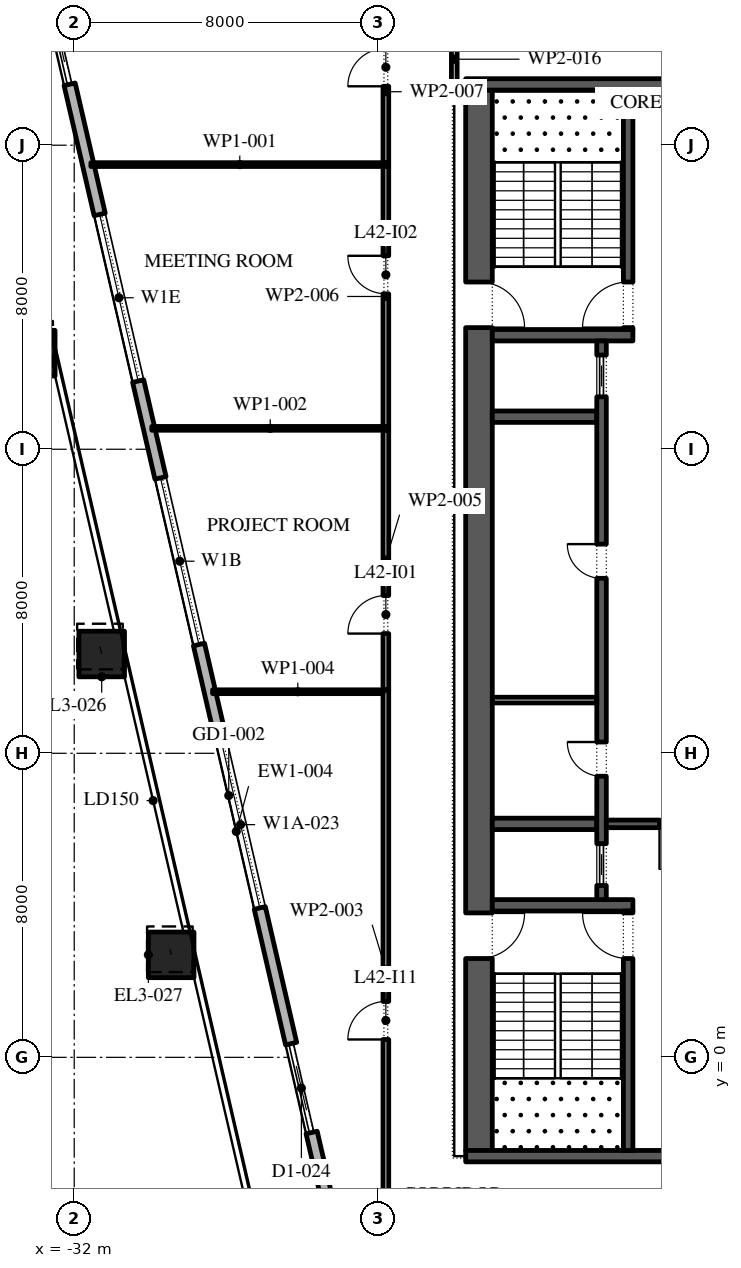
"""IFC4 building model, lengths in metres.
Left out: names, types, materials, properties, quantities, classifications, styles, units other than length and angle.
Written with IfcOpenShell. Run it as: python <this file> out.ifc"""

import sys

from ifc_helpers import new_model, si_unit, direction, frame, frame_2d, origin, origin_2d, place, context, subcontext, project, spatial, rectangle, extrude, element, fill, save


model = new_model("IFC4")
c1 = context("Model", 3, precision=1e-05, world=origin(), true_north=direction((0.0, 1.0)))
c2 = subcontext(c1, "Body", "Model", "MODEL_VIEW")
j1 = project(units=[si_unit("LENGTHUNIT", "METRE"), si_unit("PLANEANGLEUNIT", "RADIAN")], contexts=[c1])
p1 = place(None, origin())
s1 = spatial("IfcSite", under=j1, at=p1, CompositionType="ELEMENT")
p2 = place(p1, origin())
s2 = spatial("IfcBuilding", under=s1, at=p2, CompositionType="ELEMENT")
p3 = place(p2, frame((0.0, 0.0, 192.6)))
s3 = spatial("IfcBuildingStorey", under=s2, at=p3, CompositionType="ELEMENT", Elevation=192.6)
p4 = place(p3, frame((-33.104, 18.528, 0.0), z_axis=(-0.013461799865, 0.058373149415, 0.998204064995), x_axis=(-0.974423835271, -0.224718021653, 0.0)))
e1 = element("IfcColumn", 1, at=p4, inside=s3, PredefinedType="COLUMN", context=c2, shape_type="SweptSolid", body=[
    extrude(rectangle(XDim=1.2, YDim=1.2, at=origin_2d()), origin(), (0.0, 0.0, 1.0), 4.208),
])
p5 = place(p3, frame((-31.277, 10.612, 0.0), z_axis=(-0.010799619665, 0.046740289408, 0.998848694028), x_axis=(-0.974329962248, -0.225124686929, 0.0)))
e2 = element("IfcColumn", 2, at=p5, inside=s3, PredefinedType="COLUMN", context=c2, shape_type="SweptSolid", body=[
    extrude(rectangle(XDim=1.2, YDim=1.2, at=origin_2d()), origin(), (0.0, 0.0, 1.0), 4.205),
])
p6 = place(p3, frame((-29.449, 2.696, 0.0), z_axis=(-0.0080747472, 0.035087390713, 0.999351626541), x_axis=(-0.974526982896, -0.224270282488, 0.0)))
e3 = element("IfcColumn", 3, at=p6, inside=s3, PredefinedType="COLUMN", context=c2, shape_type="SweptSolid", body=[
    extrude(rectangle(XDim=1.2, YDim=1.2, at=origin_2d()), origin(), (0.0, 0.0, 1.0), 4.203),
])
p7 = place(p3, frame((-33.157, 30.092, 0.0), z_axis=(0.0, 0.0, 1.0), x_axis=(0.224950279389, -0.974370243697, 0.0)))
e4 = element("IfcWall", 4, at=p7, inside=s3, PredefinedType="STANDARD", context=c2, shape_type="SweptSolid", body=[
    extrude(rectangle(XDim=49.5, YDim=0.3, at=frame_2d((24.75, 0.0))), origin(), (0.0, 0.0, 1.0), 4.0),
])
p8 = place(p7, frame((2.207, 0.0, 0.0)))
e5 = element("IfcOpeningElement", 5, at=p8, cuts=e4, PredefinedType="OPENING", context=c2, shape_type="SweptSolid", body=[
    extrude(rectangle(XDim=2.4, YDim=3.5, at=frame_2d((1.2, 1.75))), frame((0.0, 0.16, 0.0), z_axis=(0.0, -1.0, 0.0), x_axis=(1.0, 0.0, 0.0)), (0.0, 0.0, 1.0), 0.32),
])
p9 = place(p7, frame((8.121, 0.0, 0.45)))
e6 = element("IfcOpeningElement", 6, at=p9, cuts=e4, PredefinedType="OPENING", context=c2, shape_type="SweptSolid", body=[
    extrude(rectangle(XDim=4.5, YDim=2.825, at=frame_2d((2.25, 1.413))), frame((0.0, 0.16, 0.0), z_axis=(0.0, -1.0, 0.0), x_axis=(1.0, 0.0, 0.0)), (0.0, 0.0, 1.0), 0.32),
])
p10 = place(p7, frame((15.236, 0.0, 0.45)))
e7 = element("IfcOpeningElement", 7, at=p10, cuts=e4, PredefinedType="OPENING", context=c2, shape_type="SweptSolid", body=[
    extrude(rectangle(XDim=4.5, YDim=2.95, at=frame_2d((2.25, 1.475))), frame((0.0, 0.16, 0.0), z_axis=(0.0, -1.0, 0.0), x_axis=(1.0, 0.0, 0.0)), (0.0, 0.0, 1.0), 0.32),
])
p11 = place(p7, frame((22.35, 0.0, 0.45)))
e8 = element("IfcOpeningElement", 8, at=p11, cuts=e4, PredefinedType="OPENING", context=c2, shape_type="SweptSolid", body=[
    extrude(rectangle(XDim=4.5, YDim=3.0, at=frame_2d((2.25, 1.5))), frame((0.0, 0.16, 0.0), z_axis=(0.0, -1.0, 0.0), x_axis=(1.0, 0.0, 0.0)), (0.0, 0.0, 1.0), 0.32),
])
p12 = place(p7, frame((30.514, 0.0, 0.0)))
e9 = element("IfcOpeningElement", 9, at=p12, cuts=e4, PredefinedType="OPENING", context=c2, shape_type="SweptSolid", body=[
    extrude(rectangle(XDim=2.4, YDim=3.5, at=frame_2d((1.2, 1.75))), frame((0.0, 0.16, 0.0), z_axis=(0.0, -1.0, 0.0), x_axis=(1.0, 0.0, 0.0)), (0.0, 0.0, 1.0), 0.32),
])
p13 = place(p7, frame((36.579, 0.0, 0.45)))
e10 = element("IfcOpeningElement", 10, at=p13, cuts=e4, PredefinedType="OPENING", context=c2, shape_type="SweptSolid", body=[
    extrude(rectangle(XDim=4.5, YDim=3.05, at=frame_2d((2.25, 1.525))), frame((0.0, 0.16, 0.0), z_axis=(0.0, -1.0, 0.0), x_axis=(1.0, 0.0, 0.0)), (0.0, 0.0, 1.0), 0.32),
])
p14 = place(p7, frame((43.693, 0.0, 0.45)))
e11 = element("IfcOpeningElement", 11, at=p14, cuts=e4, PredefinedType="OPENING", context=c2, shape_type="SweptSolid", body=[
    extrude(rectangle(XDim=4.5, YDim=3.05, at=frame_2d((2.25, 1.525))), frame((0.0, 0.16, 0.0), z_axis=(0.0, -1.0, 0.0), x_axis=(1.0, 0.0, 0.0)), (0.0, 0.0, 1.0), 0.32),
])
p15 = place(p3, frame((-21.35, -2.45, 0.0), z_axis=(0.0, 0.0, 1.0), x_axis=(0.0, 1.0, 0.0)))
e12 = element("IfcWall", 12, at=p15, inside=s3, PredefinedType="SHEAR", context=c2, shape_type="SweptSolid", body=[
    extrude(rectangle(XDim=27.9, YDim=0.7, at=frame_2d((13.95, 0.0))), origin(), (0.0, 0.0, 1.0), 4.0),
])
p16 = place(p15, frame((5.05, 0.0, 0.0)))
e13 = element("IfcOpeningElement", 13, at=p16, cuts=e12, PredefinedType="OPENING", context=c2, shape_type="SweptSolid", body=[
    extrude(rectangle(XDim=1.2, YDim=2.1, at=frame_2d((0.6, 1.05))), frame((0.0, 0.36, 0.0), z_axis=(0.0, -1.0, 0.0), x_axis=(1.0, 0.0, 0.0)), (0.0, 0.0, 1.0), 0.72),
])
p17 = place(p15, frame((21.65, 0.0, 0.0)))
e14 = element("IfcOpeningElement", 14, at=p17, cuts=e12, PredefinedType="OPENING", context=c2, shape_type="SweptSolid", body=[
    extrude(rectangle(XDim=1.2, YDim=2.1, at=frame_2d((0.6, 1.05))), frame((0.0, 0.36, 0.0), z_axis=(0.0, -1.0, 0.0), x_axis=(1.0, 0.0, 0.0)), (0.0, 0.0, 1.0), 0.72),
])
for number, where, z_axis, x_axis in (
    (15, (-21.7, -2.6, 0.0), (0.0, 0.0, 1.0), (1.0, 0.0, 0.0)),
    (16, (-21.7, 25.6, 0.0), (0.0, 0.0, 1.0), (1.0, 0.0, 0.0)),
):
    element("IfcWall", number, at=place(p3, frame(where, z_axis=z_axis, x_axis=x_axis)), inside=s3, PredefinedType="SHEAR", context=c2, shape_type="SweptSolid", body=[
        extrude(rectangle(XDim=11.4, YDim=0.3, at=frame_2d((5.7, 0.0))), origin(), (0.0, 0.0, 1.0), 4.0),
    ])
p18 = place(p3, frame((-21.0, 4.0, 0.0), z_axis=(0.0, 0.0, 1.0), x_axis=(1.0, 0.0, 0.0)))
e17 = element("IfcWall", 17, at=p18, inside=s3, PredefinedType="SHEAR", context=c2, shape_type="SweptSolid", body=[
    extrude(rectangle(XDim=3.7, YDim=0.3, at=frame_2d((1.85, 0.0))), origin(), (0.0, 0.0, 1.0), 4.0),
])
p19 = place(p3, frame((-17.425, -2.45, 0.0), z_axis=(0.0, 0.0, 1.0), x_axis=(0.0, 1.0, 0.0)))
e18 = element("IfcWall", 18, at=p19, inside=s3, PredefinedType="SHEAR", context=c2, shape_type="SweptSolid", body=[
    extrude(rectangle(XDim=6.3, YDim=0.25, at=frame_2d((3.15, 0.0))), origin(), (0.0, 0.0, 1.0), 4.0),
])
p20 = place(p19, frame((5.05, 0.0, 0.0)))
e19 = element("IfcOpeningElement", 19, at=p20, cuts=e18, PredefinedType="OPENING", context=c2, shape_type="SweptSolid", body=[
    extrude(rectangle(XDim=1.2, YDim=2.1, at=frame_2d((0.6, 1.05))), frame((0.0, 0.135, 0.0), z_axis=(0.0, -1.0, 0.0), x_axis=(1.0, 0.0, 0.0)), (0.0, 0.0, 1.0), 0.27),
])
p21 = place(p3, frame((-21.0, 19.0, 0.0), z_axis=(0.0, 0.0, 1.0), x_axis=(1.0, 0.0, 0.0)))
e20 = element("IfcWall", 20, at=p21, inside=s3, PredefinedType="SHEAR", context=c2, shape_type="SweptSolid", body=[
    extrude(rectangle(XDim=3.7, YDim=0.3, at=frame_2d((1.85, 0.0))), origin(), (0.0, 0.0, 1.0), 4.0),
])
p22 = place(p3, frame((-17.425, 19.15, 0.0), z_axis=(0.0, 0.0, 1.0), x_axis=(0.0, 1.0, 0.0)))
e21 = element("IfcWall", 21, at=p22, inside=s3, PredefinedType="SHEAR", context=c2, shape_type="SweptSolid", body=[
    extrude(rectangle(XDim=6.3, YDim=0.25, at=frame_2d((3.15, 0.0))), origin(), (0.0, 0.0, 1.0), 4.0),
])
p23 = place(p22, frame((0.05, 0.0, 0.0)))
e22 = element("IfcOpeningElement", 22, at=p23, cuts=e21, PredefinedType="OPENING", context=c2, shape_type="SweptSolid", body=[
    extrude(rectangle(XDim=1.2, YDim=2.1, at=frame_2d((0.6, 1.05))), frame((0.0, 0.135, 0.0), z_axis=(0.0, -1.0, 0.0), x_axis=(1.0, 0.0, 0.0)), (0.0, 0.0, 1.0), 0.27),
])
for number, where, z_axis, x_axis in (
    (23, (-21.0, 6.143, 0.0), (0.0, 0.0, 1.0), (1.0, 0.0, 0.0)),
    (24, (-21.0, 16.857, 0.0), (0.0, 0.0, 1.0), (1.0, 0.0, 0.0)),
):
    element("IfcWall", number, at=place(p3, frame(where, z_axis=z_axis, x_axis=x_axis)), inside=s3, PredefinedType="SHEAR", context=c2, shape_type="SweptSolid", body=[
        extrude(rectangle(XDim=2.75, YDim=0.3, at=frame_2d((1.375, 0.0))), origin(), (0.0, 0.0, 1.0), 4.0),
    ])
p24 = place(p3, frame((-18.125, 4.15, 0.0), z_axis=(0.0, 0.0, 1.0), x_axis=(0.0, 1.0, 0.0)))
e25 = element("IfcWall", 25, at=p24, inside=s3, PredefinedType="SHEAR", context=c2, shape_type="SweptSolid", body=[
    extrude(rectangle(XDim=14.7, YDim=0.25, at=frame_2d((7.35, 0.0))), origin(), (0.0, 0.0, 1.0), 4.0),
])
p25 = place(p24, frame((3.246, 0.0, 0.0)))
e26 = element("IfcOpeningElement", 26, at=p25, cuts=e25, PredefinedType="OPENING", context=c2, shape_type="SweptSolid", body=[
    extrude(rectangle(XDim=0.9, YDim=2.1, at=frame_2d((0.45, 1.05))), frame((0.0, 0.135, 0.0), z_axis=(0.0, -1.0, 0.0), x_axis=(1.0, 0.0, 0.0)), (0.0, 0.0, 1.0), 0.27),
])
p26 = place(p24, frame((8.454, 0.0, 0.0)))
e27 = element("IfcOpeningElement", 27, at=p26, cuts=e25, PredefinedType="OPENING", context=c2, shape_type="SweptSolid", body=[
    extrude(rectangle(XDim=0.9, YDim=2.1, at=frame_2d((0.45, 1.05))), frame((0.0, 0.135, 0.0), z_axis=(0.0, -1.0, 0.0), x_axis=(1.0, 0.0, 0.0)), (0.0, 0.0, 1.0), 0.27),
])
p27 = place(p24, frame((0.371, 0.0, 0.0)))
e28 = element("IfcOpeningElement", 28, at=p27, cuts=e25, PredefinedType="OPENING", context=c2, shape_type="SweptSolid", body=[
    extrude(rectangle(XDim=1.1, YDim=2.1, at=frame_2d((0.55, 1.05))), frame((0.0, 0.135, 0.0), z_axis=(0.0, -1.0, 0.0), x_axis=(1.0, 0.0, 0.0)), (0.0, 0.0, 1.0), 0.27),
])
p28 = place(p24, frame((13.229, 0.0, 0.0)))
e29 = element("IfcOpeningElement", 29, at=p28, cuts=e25, PredefinedType="OPENING", context=c2, shape_type="SweptSolid", body=[
    extrude(rectangle(XDim=1.1, YDim=2.1, at=frame_2d((0.55, 1.05))), frame((0.0, 0.135, 0.0), z_axis=(0.0, -1.0, 0.0), x_axis=(1.0, 0.0, 0.0)), (0.0, 0.0, 1.0), 0.27),
])
p29 = place(p3, frame((-21.0, 9.4, 0.0), z_axis=(0.0, 0.0, 1.0), x_axis=(1.0, 0.0, 0.0)))
e30 = element("IfcWall", 30, at=p29, inside=s3, PredefinedType="PARTITIONING", context=c2, shape_type="SweptSolid", body=[
    extrude(rectangle(XDim=2.75, YDim=0.15, at=frame_2d((1.375, 0.0))), origin(), (0.0, 0.0, 1.0), 4.0),
])
p30 = place(p3, frame((-18.0, 6.143, 0.0), z_axis=(0.0, 0.0, 1.0), x_axis=(1.0, 0.0, 0.0)))
e31 = element("IfcWall", 31, at=p30, inside=s3, PredefinedType="SHEAR", context=c2, shape_type="SweptSolid", body=[
    extrude(rectangle(XDim=4.0, YDim=0.2, at=frame_2d((2.0, 0.0))), origin(), (0.0, 0.0, 1.0), 4.0),
])
p31 = place(p30, frame((1.4, 0.0, 0.0)))
e32 = element("IfcOpeningElement", 32, at=p31, cuts=e31, PredefinedType="OPENING", context=c2, shape_type="SweptSolid", body=[
    extrude(rectangle(XDim=1.2, YDim=2.1, at=frame_2d((0.6, 1.05))), frame((0.0, 0.11, 0.0), z_axis=(0.0, -1.0, 0.0), x_axis=(1.0, 0.0, 0.0)), (0.0, 0.0, 1.0), 0.22),
])
p32 = place(p3, frame((-31.562, 23.49, 0.0), z_axis=(0.0, 0.0, 1.0), x_axis=(1.0, 0.0, 0.0)))
e33 = element("IfcWall", 33, at=p32, inside=s3, PredefinedType="PARTITIONING", context=c2, shape_type="SweptSolid", body=[
    extrude(rectangle(XDim=7.837, YDim=0.1, at=frame_2d((3.918, 0.0))), origin(), (0.0, 0.0, 1.0), 4.0),
])
p33 = place(p3, frame((-29.959, 16.55, 0.0), z_axis=(0.0, 0.0, 1.0), x_axis=(1.0, 0.0, 0.0)))
e34 = element("IfcWall", 34, at=p33, inside=s3, PredefinedType="PARTITIONING", context=c2, shape_type="SweptSolid", body=[
    extrude(rectangle(XDim=6.234, YDim=0.1, at=frame_2d((3.117, 0.0))), origin(), (0.0, 0.0, 1.0), 4.0),
])
p34 = place(p3, frame((-23.8, -5.075, 0.0), z_axis=(0.0, 0.0, 1.0), x_axis=(0.0, 1.0, 0.0)))
e35 = element("IfcWall", 35, at=p34, inside=s3, PredefinedType="PARTITIONING", context=c2, shape_type="SweptSolid", body=[
    extrude(rectangle(XDim=14.745, YDim=0.15, at=frame_2d((7.373, 0.0))), origin(), (0.0, 0.0, 1.0), 4.0),
])
p35 = place(p34, frame((5.545, 0.0, 0.0)))
e36 = element("IfcOpeningElement", 36, at=p35, cuts=e35, PredefinedType="OPENING", context=c2, shape_type="SweptSolid", body=[
    extrude(rectangle(XDim=1.0, YDim=2.1, at=frame_2d((0.5, 1.05))), frame((0.0, 0.085, 0.0), z_axis=(0.0, -1.0, 0.0), x_axis=(1.0, 0.0, 0.0)), (0.0, 0.0, 1.0), 0.17),
])
p36 = place(p3, frame((-23.875, 9.62, 0.0), z_axis=(0.0, 0.0, 1.0), x_axis=(-1.0, 0.0, 0.0)))
e37 = element("IfcWall", 37, at=p36, inside=s3, PredefinedType="PARTITIONING", context=c2, shape_type="SweptSolid", body=[
    extrude(rectangle(XDim=4.485, YDim=0.1, at=frame_2d((2.243, 0.0))), origin(), (0.0, 0.0, 1.0), 4.0),
])
p37 = place(p3, frame((-23.8, 9.67, 0.0), z_axis=(0.0, 0.0, 1.0), x_axis=(0.0, 1.0, 0.0)))
e38 = element("IfcWall", 38, at=p37, inside=s3, PredefinedType="PARTITIONING", context=c2, shape_type="SweptSolid", body=[
    extrude(rectangle(XDim=6.83, YDim=0.15, at=frame_2d((3.415, 0.0))), origin(), (0.0, 0.0, 1.0), 4.0),
])
p38 = place(p37, frame((1.48, 0.0, 0.0)))
e39 = element("IfcOpeningElement", 39, at=p38, cuts=e38, PredefinedType="OPENING", context=c2, shape_type="SweptSolid", body=[
    extrude(rectangle(XDim=1.0, YDim=2.1, at=frame_2d((0.5, 1.05))), frame((0.0, 0.085, 0.0), z_axis=(0.0, -1.0, 0.0), x_axis=(1.0, 0.0, 0.0)), (0.0, 0.0, 1.0), 0.17),
])
p39 = place(p3, frame((-23.8, 16.6, 0.0), z_axis=(0.0, 0.0, 1.0), x_axis=(0.0, 1.0, 0.0)))
e40 = element("IfcWall", 40, at=p39, inside=s3, PredefinedType="PARTITIONING", context=c2, shape_type="SweptSolid", body=[
    extrude(rectangle(XDim=6.84, YDim=0.15, at=frame_2d((3.42, 0.0))), origin(), (0.0, 0.0, 1.0), 4.0),
])
p40 = place(p39, frame((3.49, 0.0, 0.0)))
e41 = element("IfcOpeningElement", 41, at=p40, cuts=e40, PredefinedType="OPENING", context=c2, shape_type="SweptSolid", body=[
    extrude(rectangle(XDim=1.0, YDim=2.1, at=frame_2d((0.5, 1.05))), frame((0.0, 0.085, 0.0), z_axis=(0.0, -1.0, 0.0), x_axis=(1.0, 0.0, 0.0)), (0.0, 0.0, 1.0), 0.17),
])
p41 = place(p3, frame((-23.8, 23.54, 0.0), z_axis=(0.0, 0.0, 1.0), x_axis=(0.0, 1.0, 0.0)))
e42 = element("IfcWall", 42, at=p41, inside=s3, PredefinedType="PARTITIONING", context=c2, shape_type="SweptSolid", body=[
    extrude(rectangle(XDim=3.735, YDim=0.15, at=frame_2d((1.867, 0.0))), origin(), (0.0, 0.0, 1.0), 4.0),
])
p42 = place(p41, frame((2.01, 0.0, 0.0)))
e43 = element("IfcOpeningElement", 43, at=p42, cuts=e42, PredefinedType="OPENING", context=c2, shape_type="SweptSolid", body=[
    extrude(rectangle(XDim=1.0, YDim=2.1, at=frame_2d((0.5, 1.05))), frame((0.0, 0.085, 0.0), z_axis=(0.0, -1.0, 0.0), x_axis=(1.0, 0.0, 0.0)), (0.0, 0.0, 1.0), 0.17),
])
p43 = place(p3, frame((-22.0, 27.125, 0.0), z_axis=(0.0, 0.0, 1.0), x_axis=(0.0, -1.0, 0.0)))
e44 = element("IfcWall", 44, at=p43, inside=s3, PredefinedType="PARTITIONING", context=c2, shape_type="SweptSolid", body=[
    extrude(rectangle(XDim=1.725, YDim=0.15, at=frame_2d((0.863, 0.0))), origin(), (0.0, 0.0, 1.0), 4.0),
])
p44 = place(p8, origin())
e45 = element("IfcDoor", 45, at=p44, inside=s3, OperationType="DOUBLE_DOOR_SLIDING", PredefinedType="DOOR", context=c2, shape_type="SweptSolid", body=[
    extrude(rectangle(XDim=2.4, YDim=3.5, at=frame_2d((1.2, 1.75))), frame((0.0, 0.025, 0.0), z_axis=(0.0, -1.0, 0.0), x_axis=(1.0, 0.0, 0.0)), (0.0, 0.0, 1.0), 0.05),
])
fill(e5, e45)
p45 = place(p9, origin())
e46 = element("IfcWindow", 46, at=p45, inside=s3, PartitioningType="DOUBLE_PANEL_VERTICAL", PredefinedType="WINDOW", context=c2, shape_type="SweptSolid", body=[
    extrude(rectangle(XDim=4.5, YDim=2.825, at=frame_2d((2.25, 1.413))), frame((0.0, 0.03, 0.0), z_axis=(0.0, -1.0, 0.0), x_axis=(1.0, 0.0, 0.0)), (0.0, 0.0, 1.0), 0.06),
])
fill(e6, e46)
p46 = place(p10, origin())
e47 = element("IfcWindow", 47, at=p46, inside=s3, PartitioningType="DOUBLE_PANEL_VERTICAL", PredefinedType="WINDOW", context=c2, shape_type="SweptSolid", body=[
    extrude(rectangle(XDim=4.5, YDim=2.95, at=frame_2d((2.25, 1.475))), frame((0.0, 0.03, 0.0), z_axis=(0.0, -1.0, 0.0), x_axis=(1.0, 0.0, 0.0)), (0.0, 0.0, 1.0), 0.06),
])
fill(e7, e47)
p47 = place(p11, origin())
e48 = element("IfcWindow", 48, at=p47, inside=s3, PartitioningType="DOUBLE_PANEL_VERTICAL", PredefinedType="WINDOW", context=c2, shape_type="SweptSolid", body=[
    extrude(rectangle(XDim=4.5, YDim=3.0, at=frame_2d((2.25, 1.5))), frame((0.0, 0.03, 0.0), z_axis=(0.0, -1.0, 0.0), x_axis=(1.0, 0.0, 0.0)), (0.0, 0.0, 1.0), 0.06),
])
fill(e8, e48)
p48 = place(p12, origin())
e49 = element("IfcDoor", 49, at=p48, inside=s3, OperationType="DOUBLE_DOOR_SLIDING", PredefinedType="DOOR", context=c2, shape_type="SweptSolid", body=[
    extrude(rectangle(XDim=2.4, YDim=3.5, at=frame_2d((1.2, 1.75))), frame((0.0, 0.025, 0.0), z_axis=(0.0, -1.0, 0.0), x_axis=(1.0, 0.0, 0.0)), (0.0, 0.0, 1.0), 0.05),
])
fill(e9, e49)
p49 = place(p25, origin())
e50 = element("IfcDoor", 50, at=p49, inside=s3, OperationType="SINGLE_SWING_LEFT", PredefinedType="DOOR", context=c2, shape_type="SweptSolid", body=[
    extrude(rectangle(XDim=0.9, YDim=2.1, at=frame_2d((0.45, 1.05))), frame((0.0, 0.125, 0.0), z_axis=(0.0, -1.0, 0.0), x_axis=(1.0, 0.0, 0.0)), (0.0, 0.0, 1.0), 0.05),
])
fill(e26, e50)
p50 = place(p26, origin())
e51 = element("IfcDoor", 51, at=p50, inside=s3, OperationType="SINGLE_SWING_LEFT", PredefinedType="DOOR", context=c2, shape_type="SweptSolid", body=[
    extrude(rectangle(XDim=0.9, YDim=2.1, at=frame_2d((0.45, 1.05))), frame((0.0, 0.125, 0.0), z_axis=(0.0, -1.0, 0.0), x_axis=(1.0, 0.0, 0.0)), (0.0, 0.0, 1.0), 0.05),
])
fill(e27, e51)
p51 = place(p27, origin())
e52 = element("IfcDoor", 52, at=p51, inside=s3, OperationType="SLIDING_TO_LEFT", PredefinedType="DOOR", context=c2, shape_type="SweptSolid", body=[
    extrude(rectangle(XDim=1.1, YDim=2.1, at=frame_2d((0.55, 1.05))), frame((0.0, 0.025, 0.0), z_axis=(0.0, -1.0, 0.0), x_axis=(1.0, 0.0, 0.0)), (0.0, 0.0, 1.0), 0.05),
])
fill(e28, e52)
p52 = place(p28, origin())
e53 = element("IfcDoor", 53, at=p52, inside=s3, OperationType="SLIDING_TO_LEFT", PredefinedType="DOOR", context=c2, shape_type="SweptSolid", body=[
    extrude(rectangle(XDim=1.1, YDim=2.1, at=frame_2d((0.55, 1.05))), frame((0.0, 0.025, 0.0), z_axis=(0.0, -1.0, 0.0), x_axis=(1.0, 0.0, 0.0)), (0.0, 0.0, 1.0), 0.05),
])
fill(e29, e53)
p53 = place(p31, frame((1.2, 0.0, 0.0), z_axis=(0.0, 0.0, 1.0), x_axis=(-1.0, 0.0, 0.0)))
e54 = element("IfcDoor", 54, at=p53, inside=s3, OperationType="SINGLE_SWING_LEFT", PredefinedType="DOOR", context=c2, shape_type="SweptSolid", body=[
    extrude(rectangle(XDim=1.2, YDim=2.1, at=frame_2d((0.6, 1.05))), frame((0.0, 0.025, 0.0), z_axis=(0.0, -1.0, 0.0), x_axis=(1.0, 0.0, 0.0)), (0.0, 0.0, 1.0), 0.05),
])
fill(e32, e54)
p54 = place(p20, origin())
e55 = element("IfcDoor", 55, at=p54, inside=s3, OperationType="SINGLE_SWING_LEFT", PredefinedType="DOOR", context=c2, shape_type="SweptSolid", body=[
    extrude(rectangle(XDim=1.2, YDim=2.1, at=frame_2d((0.6, 1.05))), frame((0.0, 0.025, 0.0), z_axis=(0.0, -1.0, 0.0), x_axis=(1.0, 0.0, 0.0)), (0.0, 0.0, 1.0), 0.05),
])
fill(e19, e55)
p55 = place(p16, frame((1.2, 0.0, 0.0), z_axis=(0.0, 0.0, 1.0), x_axis=(-1.0, 0.0, 0.0)))
e56 = element("IfcDoor", 56, at=p55, inside=s3, OperationType="SINGLE_SWING_RIGHT", PredefinedType="DOOR", context=c2, shape_type="SweptSolid", body=[
    extrude(rectangle(XDim=1.2, YDim=2.1, at=frame_2d((0.6, 1.05))), frame((0.0, 0.025, 0.0), z_axis=(0.0, -1.0, 0.0), x_axis=(1.0, 0.0, 0.0)), (0.0, 0.0, 1.0), 0.05),
])
fill(e13, e56)
p56 = place(p23, origin())
e57 = element("IfcDoor", 57, at=p56, inside=s3, OperationType="SINGLE_SWING_RIGHT", PredefinedType="DOOR", context=c2, shape_type="SweptSolid", body=[
    extrude(rectangle(XDim=1.2, YDim=2.1, at=frame_2d((0.6, 1.05))), frame((0.0, 0.025, 0.0), z_axis=(0.0, -1.0, 0.0), x_axis=(1.0, 0.0, 0.0)), (0.0, 0.0, 1.0), 0.05),
])
fill(e22, e57)
p57 = place(p17, frame((1.2, 0.0, 0.0), z_axis=(0.0, 0.0, 1.0), x_axis=(-1.0, 0.0, 0.0)))
e58 = element("IfcDoor", 58, at=p57, inside=s3, OperationType="SINGLE_SWING_LEFT", PredefinedType="DOOR", context=c2, shape_type="SweptSolid", body=[
    extrude(rectangle(XDim=1.2, YDim=2.1, at=frame_2d((0.6, 1.05))), frame((0.0, 0.025, 0.0), z_axis=(0.0, -1.0, 0.0), x_axis=(1.0, 0.0, 0.0)), (0.0, 0.0, 1.0), 0.05),
])
fill(e14, e58)
p58 = place(p38, origin())
e59 = element("IfcDoor", 59, at=p58, inside=s3, OperationType="SINGLE_SWING_RIGHT", PredefinedType="DOOR", context=c2, shape_type="SweptSolid", body=[
    extrude(rectangle(XDim=1.0, YDim=2.1, at=frame_2d((0.5, 1.05))), frame((0.0, 0.025, 0.0), z_axis=(0.0, -1.0, 0.0), x_axis=(1.0, 0.0, 0.0)), (0.0, 0.0, 1.0), 0.05),
])
fill(e39, e59)
p59 = place(p40, origin())
e60 = element("IfcDoor", 60, at=p59, inside=s3, OperationType="SINGLE_SWING_LEFT", PredefinedType="DOOR", context=c2, shape_type="SweptSolid", body=[
    extrude(rectangle(XDim=1.0, YDim=2.1, at=frame_2d((0.5, 1.05))), frame((0.0, 0.025, 0.0), z_axis=(0.0, -1.0, 0.0), x_axis=(1.0, 0.0, 0.0)), (0.0, 0.0, 1.0), 0.05),
])
fill(e41, e60)
p60 = place(p42, origin())
e61 = element("IfcDoor", 61, at=p60, inside=s3, OperationType="SINGLE_SWING_RIGHT", PredefinedType="DOOR", context=c2, shape_type="SweptSolid", body=[
    extrude(rectangle(XDim=1.0, YDim=2.1, at=frame_2d((0.5, 1.05))), frame((0.0, 0.025, 0.0), z_axis=(0.0, -1.0, 0.0), x_axis=(1.0, 0.0, 0.0)), (0.0, 0.0, 1.0), 0.05),
])
fill(e43, e61)
p61 = place(p35, origin())
e62 = element("IfcDoor", 62, at=p61, inside=s3, OperationType="SINGLE_SWING_RIGHT", PredefinedType="DOOR", context=c2, shape_type="SweptSolid", body=[
    extrude(rectangle(XDim=1.0, YDim=2.1, at=frame_2d((0.5, 1.05))), frame((0.0, 0.025, 0.0), z_axis=(0.0, -1.0, 0.0), x_axis=(1.0, 0.0, 0.0)), (0.0, 0.0, 1.0), 0.05),
])
fill(e36, e62)
save(model, sys.argv[1])
